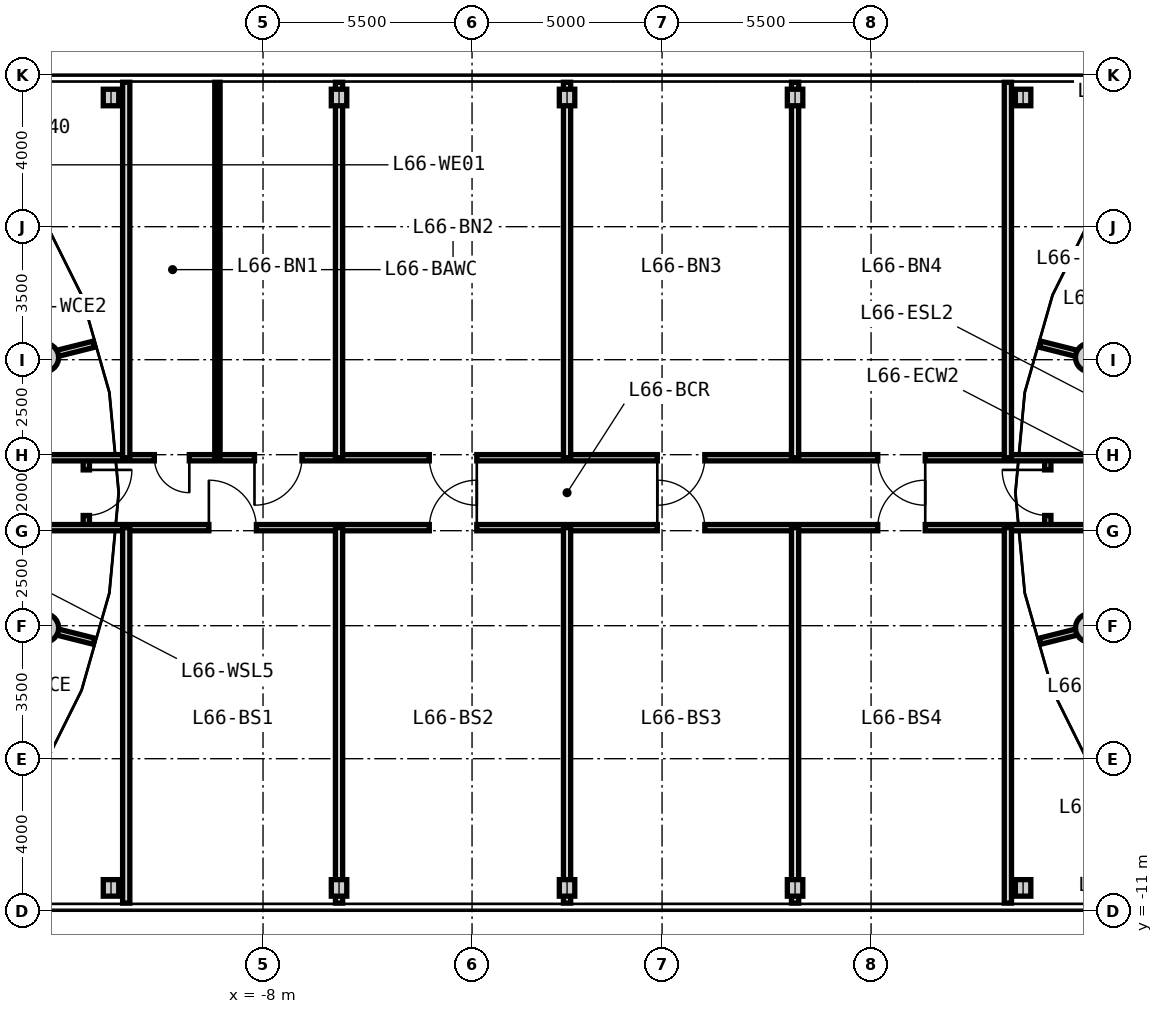
"""IFC4 building model, lengths in metres.
Left out: names, types, materials, properties, quantities, classifications, styles, units other than length and angle.
Written with IfcOpenShell. Run it as: python <this file> out.ifc"""

import sys

from ifc_helpers import new_model, si_unit, direction, frame, frame_2d, origin, origin_2d, place, context, subcontext, project, spatial, rectangle, circle, i_section, extrude, source, transform, mapped, element, fill, save


model = new_model("IFC4")
c1 = context("Model", 3, precision=1e-05, world=origin(), true_north=direction((0.0, 1.0)))
c2 = subcontext(c1, "Body", "Model", "MODEL_VIEW")
j1 = project(units=[si_unit("LENGTHUNIT", "METRE"), si_unit("PLANEANGLEUNIT", "RADIAN")], contexts=[c1])
p1 = place(None, origin())
s1 = spatial("IfcSite", under=j1, at=p1, CompositionType="ELEMENT")
p2 = place(p1, origin())
s2 = spatial("IfcBuilding", under=s1, at=p2, CompositionType="ELEMENT")
p3 = place(p2, frame((0.0, 0.0, 213.9)))
s3 = spatial("IfcBuildingStorey", under=s2, at=p3, CompositionType="ELEMENT", Elevation=213.9)
m1 = source(origin(), c2, "Body", "SweptSolid", [
    extrude(circle(Radius=0.375, at=origin_2d()), origin(), (0.0, 0.0, 1.0), 3.05),
])
for number, where, z_axis, x_axis in (
    (1, (-13.753, 3.559, 0.0), (0.0, 0.0, 1.0), (1.0, 0.0, 0.0)),
    (2, (-13.753, -3.559, 0.0), (0.0, 0.0, 1.0), (1.0, 0.0, 0.0)),
    (3, (13.753, 3.559, 0.0), (0.0, 0.0, 1.0), (1.0, 0.0, 0.0)),
    (4, (13.753, -3.559, 0.0), (0.0, 0.0, 1.0), (1.0, 0.0, 0.0)),
):
    element("IfcColumn", number, at=place(p3, frame(where, z_axis=z_axis, x_axis=x_axis)), inside=s3, PredefinedType="COLUMN", context=c2, shape_type="MappedRepresentation", body=[
        mapped(m1, transform((0.0, 0.0, 0.0), x_axis=(1.0, 0.0, 0.0), y_axis=(0.0, 1.0, 0.0), z_axis=(0.0, 0.0, 1.0), scale=1.0)),
    ])
m2 = source(origin(), c2, "Body", "SweptSolid", [
    extrude(i_section(OverallWidth=0.407, OverallDepth=0.435, WebThickness=0.024, FlangeThickness=0.039, FilletRadius=0.015, at=origin_2d()), origin(), (0.0, 0.0, 1.0), 3.05),
])
for number, where, z_axis, x_axis in (
    (5, (-12.0, -10.4, 0.0), (0.0, 0.0, 1.0), (1.0, 0.0, 0.0)),
    (6, (-12.0, 10.4, 0.0), (0.0, 0.0, 1.0), (1.0, 0.0, 0.0)),
    (7, (-6.0, -10.4, 0.0), (0.0, 0.0, 1.0), (1.0, 0.0, 0.0)),
    (8, (-6.0, 10.4, 0.0), (0.0, 0.0, 1.0), (1.0, 0.0, 0.0)),
    (9, (0.0, -10.4, 0.0), (0.0, 0.0, 1.0), (1.0, 0.0, 0.0)),
    (10, (0.0, 10.4, 0.0), (0.0, 0.0, 1.0), (1.0, 0.0, 0.0)),
    (11, (6.0, -10.4, 0.0), (0.0, 0.0, 1.0), (1.0, 0.0, 0.0)),
    (12, (6.0, 10.4, 0.0), (0.0, 0.0, 1.0), (1.0, 0.0, 0.0)),
    (13, (12.0, -10.4, 0.0), (0.0, 0.0, 1.0), (1.0, 0.0, 0.0)),
    (14, (12.0, 10.4, 0.0), (0.0, 0.0, 1.0), (1.0, 0.0, 0.0)),
):
    element("IfcColumn", number, at=place(p3, frame(where, z_axis=z_axis, x_axis=x_axis)), inside=s3, PredefinedType="COLUMN", context=c2, shape_type="MappedRepresentation", body=[
        mapped(m2, transform((0.0, 0.0, 0.0), x_axis=(1.0, 0.0, 0.0), y_axis=(0.0, 1.0, 0.0), z_axis=(0.0, 0.0, 1.0), scale=1.0)),
    ])
m3 = source(origin(), c2, "Body", "SweptSolid", [
    extrude(rectangle(XDim=6.157, YDim=0.165, at=frame_2d((3.079, 0.0))), origin(), (0.0, 0.0, 1.0), 2.345),
])
for number, where, z_axis, x_axis in (
    (15, (-18.42, -2.407, 0.0), (0.0, 0.0, 1.0), (0.97, -0.244, 0.0)),
    (16, (-18.42, 2.407, 0.0), (0.0, 0.0, 1.0), (0.97, 0.244, 0.0)),
    (17, (18.42, 2.407, 0.0), (0.0, 0.0, 1.0), (-0.97, 0.244, 0.0)),
    (18, (18.42, -2.407, 0.0), (0.0, 0.0, 1.0), (-0.97, -0.244, 0.0)),
):
    element("IfcWall", number, at=place(p3, frame(where, z_axis=z_axis, x_axis=x_axis)), inside=s3, PredefinedType="PARTITIONING", context=c2, shape_type="MappedRepresentation", body=[
        mapped(m3, transform((0.0, 0.0, 0.0), x_axis=(1.0, 0.0, 0.0), y_axis=(0.0, 1.0, 0.0), z_axis=(0.0, 0.0, 1.0), scale=1.0)),
    ])
m4 = source(origin(), c2, "Body", "SweptSolid", [
    extrude(rectangle(XDim=1.84, YDim=0.165, at=frame_2d((0.92, 0.0))), origin(), (0.0, 0.0, 1.0), 2.745),
])
p4 = place(p3, frame((-12.65, -0.92, 0.0), z_axis=(0.0, 0.0, 1.0), x_axis=(0.0, 1.0, 0.0)))
e19 = element("IfcWall", 19, at=p4, inside=s3, PredefinedType="PARTITIONING", context=c2, shape_type="MappedRepresentation", body=[
    mapped(m4, transform((0.0, 0.0, 0.0), x_axis=(1.0, 0.0, 0.0), y_axis=(0.0, 1.0, 0.0), z_axis=(0.0, 0.0, 1.0), scale=1.0)),
])
p5 = place(p4, frame((0.32, 0.0, 0.0)))
e20 = element("IfcOpeningElement", 20, at=p5, cuts=e19, PredefinedType="OPENING", context=c2, shape_type="SweptSolid", body=[
    extrude(rectangle(XDim=1.2, YDim=2.15, at=frame_2d((0.6, 1.075))), frame((0.0, 0.093, 0.0), z_axis=(0.0, -1.0, 0.0), x_axis=(1.0, 0.0, 0.0)), (0.0, 0.0, 1.0), 0.185),
])
p6 = place(p3, frame((12.65, -0.92, 0.0), z_axis=(0.0, 0.0, 1.0), x_axis=(0.0, 1.0, 0.0)))
e21 = element("IfcWall", 21, at=p6, inside=s3, PredefinedType="PARTITIONING", context=c2, shape_type="MappedRepresentation", body=[
    mapped(m4, transform((0.0, 0.0, 0.0), x_axis=(1.0, 0.0, 0.0), y_axis=(0.0, 1.0, 0.0), z_axis=(0.0, 0.0, 1.0), scale=1.0)),
])
p7 = place(p6, frame((0.32, 0.0, 0.0)))
e22 = element("IfcOpeningElement", 22, at=p7, cuts=e21, PredefinedType="OPENING", context=c2, shape_type="SweptSolid", body=[
    extrude(rectangle(XDim=1.2, YDim=2.15, at=frame_2d((0.6, 1.075))), frame((0.0, 0.093, 0.0), z_axis=(0.0, -1.0, 0.0), x_axis=(1.0, 0.0, 0.0)), (0.0, 0.0, 1.0), 0.185),
])
m5 = source(origin(), c2, "Body", "SweptSolid", [
    extrude(rectangle(XDim=37.0, YDim=0.165, at=frame_2d((18.5, 0.0))), origin(), (0.0, 0.0, 1.0), 2.745),
])
p8 = place(p3, frame((-18.5, -0.92, 0.0), z_axis=(0.0, 0.0, 1.0), x_axis=(1.0, 0.0, 0.0)))
e23 = element("IfcWall", 23, at=p8, inside=s3, PredefinedType="PARTITIONING", context=c2, shape_type="MappedRepresentation", body=[
    mapped(m5, transform((0.0, 0.0, 0.0), x_axis=(1.0, 0.0, 0.0), y_axis=(0.0, 1.0, 0.0), z_axis=(0.0, 0.0, 1.0), scale=1.0)),
])
p9 = place(p8, frame((2.662, 0.0, 0.0)))
e24 = element("IfcOpeningElement", 24, at=p9, cuts=e23, PredefinedType="OPENING", context=c2, shape_type="SweptSolid", body=[
    extrude(rectangle(XDim=0.95, YDim=2.1, at=frame_2d((0.475, 1.05))), frame((0.0, 0.093, 0.0), z_axis=(0.0, -1.0, 0.0), x_axis=(1.0, 0.0, 0.0)), (0.0, 0.0, 1.0), 0.185),
])
p10 = place(p8, frame((33.388, 0.0, 0.0)))
e25 = element("IfcOpeningElement", 25, at=p10, cuts=e23, PredefinedType="OPENING", context=c2, shape_type="SweptSolid", body=[
    extrude(rectangle(XDim=0.95, YDim=2.1, at=frame_2d((0.475, 1.05))), frame((0.0, 0.093, 0.0), z_axis=(0.0, -1.0, 0.0), x_axis=(1.0, 0.0, 0.0)), (0.0, 0.0, 1.0), 0.185),
])
p11 = place(p8, frame((9.075, 0.0, 0.0)))
e26 = element("IfcOpeningElement", 26, at=p11, cuts=e23, PredefinedType="OPENING", context=c2, shape_type="SweptSolid", body=[
    extrude(rectangle(XDim=1.25, YDim=2.2, at=frame_2d((0.625, 1.1))), frame((0.0, 0.093, 0.0), z_axis=(0.0, -1.0, 0.0), x_axis=(1.0, 0.0, 0.0)), (0.0, 0.0, 1.0), 0.185),
])
p12 = place(p8, frame((14.875, 0.0, 0.0)))
e27 = element("IfcOpeningElement", 27, at=p12, cuts=e23, PredefinedType="OPENING", context=c2, shape_type="SweptSolid", body=[
    extrude(rectangle(XDim=1.25, YDim=2.2, at=frame_2d((0.625, 1.1))), frame((0.0, 0.093, 0.0), z_axis=(0.0, -1.0, 0.0), x_axis=(1.0, 0.0, 0.0)), (0.0, 0.0, 1.0), 0.185),
])
p13 = place(p8, frame((20.875, 0.0, 0.0)))
e28 = element("IfcOpeningElement", 28, at=p13, cuts=e23, PredefinedType="OPENING", context=c2, shape_type="SweptSolid", body=[
    extrude(rectangle(XDim=1.25, YDim=2.2, at=frame_2d((0.625, 1.1))), frame((0.0, 0.093, 0.0), z_axis=(0.0, -1.0, 0.0), x_axis=(1.0, 0.0, 0.0)), (0.0, 0.0, 1.0), 0.185),
])
p14 = place(p8, frame((26.675, 0.0, 0.0)))
e29 = element("IfcOpeningElement", 29, at=p14, cuts=e23, PredefinedType="OPENING", context=c2, shape_type="SweptSolid", body=[
    extrude(rectangle(XDim=1.25, YDim=2.2, at=frame_2d((0.625, 1.1))), frame((0.0, 0.093, 0.0), z_axis=(0.0, -1.0, 0.0), x_axis=(1.0, 0.0, 0.0)), (0.0, 0.0, 1.0), 0.185),
])
p15 = place(p3, frame((-18.5, 0.92, 0.0), z_axis=(0.0, 0.0, 1.0), x_axis=(1.0, 0.0, 0.0)))
e30 = element("IfcWall", 30, at=p15, inside=s3, PredefinedType="PARTITIONING", context=c2, shape_type="MappedRepresentation", body=[
    mapped(m5, transform((0.0, 0.0, 0.0), x_axis=(1.0, 0.0, 0.0), y_axis=(0.0, 1.0, 0.0), z_axis=(0.0, 0.0, 1.0), scale=1.0)),
])
p16 = place(p15, frame((2.662, 0.0, 0.0)))
e31 = element("IfcOpeningElement", 31, at=p16, cuts=e30, PredefinedType="OPENING", context=c2, shape_type="SweptSolid", body=[
    extrude(rectangle(XDim=0.95, YDim=2.1, at=frame_2d((0.475, 1.05))), frame((0.0, 0.093, 0.0), z_axis=(0.0, -1.0, 0.0), x_axis=(1.0, 0.0, 0.0)), (0.0, 0.0, 1.0), 0.185),
])
p17 = place(p15, frame((33.388, 0.0, 0.0)))
e32 = element("IfcOpeningElement", 32, at=p17, cuts=e30, PredefinedType="OPENING", context=c2, shape_type="SweptSolid", body=[
    extrude(rectangle(XDim=0.95, YDim=2.1, at=frame_2d((0.475, 1.05))), frame((0.0, 0.093, 0.0), z_axis=(0.0, -1.0, 0.0), x_axis=(1.0, 0.0, 0.0)), (0.0, 0.0, 1.0), 0.185),
])
p18 = place(p15, frame((7.64, 0.0, 0.0)))
e33 = element("IfcOpeningElement", 33, at=p18, cuts=e30, PredefinedType="OPENING", context=c2, shape_type="SweptSolid", body=[
    extrude(rectangle(XDim=0.92, YDim=2.1, at=frame_2d((0.46, 1.05))), frame((0.0, 0.093, 0.0), z_axis=(0.0, -1.0, 0.0), x_axis=(1.0, 0.0, 0.0)), (0.0, 0.0, 1.0), 0.185),
])
p19 = place(p15, frame((10.275, 0.0, 0.0)))
e34 = element("IfcOpeningElement", 34, at=p19, cuts=e30, PredefinedType="OPENING", context=c2, shape_type="SweptSolid", body=[
    extrude(rectangle(XDim=1.25, YDim=2.2, at=frame_2d((0.625, 1.1))), frame((0.0, 0.093, 0.0), z_axis=(0.0, -1.0, 0.0), x_axis=(1.0, 0.0, 0.0)), (0.0, 0.0, 1.0), 0.185),
])
p20 = place(p15, frame((14.875, 0.0, 0.0)))
e35 = element("IfcOpeningElement", 35, at=p20, cuts=e30, PredefinedType="OPENING", context=c2, shape_type="SweptSolid", body=[
    extrude(rectangle(XDim=1.25, YDim=2.2, at=frame_2d((0.625, 1.1))), frame((0.0, 0.093, 0.0), z_axis=(0.0, -1.0, 0.0), x_axis=(1.0, 0.0, 0.0)), (0.0, 0.0, 1.0), 0.185),
])
p21 = place(p15, frame((20.875, 0.0, 0.0)))
e36 = element("IfcOpeningElement", 36, at=p21, cuts=e30, PredefinedType="OPENING", context=c2, shape_type="SweptSolid", body=[
    extrude(rectangle(XDim=1.25, YDim=2.2, at=frame_2d((0.625, 1.1))), frame((0.0, 0.093, 0.0), z_axis=(0.0, -1.0, 0.0), x_axis=(1.0, 0.0, 0.0)), (0.0, 0.0, 1.0), 0.185),
])
p22 = place(p15, frame((26.675, 0.0, 0.0)))
e37 = element("IfcOpeningElement", 37, at=p22, cuts=e30, PredefinedType="OPENING", context=c2, shape_type="SweptSolid", body=[
    extrude(rectangle(XDim=1.25, YDim=2.2, at=frame_2d((0.625, 1.1))), frame((0.0, 0.093, 0.0), z_axis=(0.0, -1.0, 0.0), x_axis=(1.0, 0.0, 0.0)), (0.0, 0.0, 1.0), 0.185),
])
m6 = source(origin(), c2, "Body", "SweptSolid", [
    extrude(rectangle(XDim=9.88, YDim=0.19, at=frame_2d((4.94, 0.0))), origin(), (0.0, 0.0, 1.0), 2.745),
])
for number, where, z_axis, x_axis in (
    (38, (-11.6, -10.8, 0.0), (0.0, 0.0, 1.0), (0.0, 1.0, 0.0)),
    (39, (-11.6, 0.92, 0.0), (0.0, 0.0, 1.0), (0.0, 1.0, 0.0)),
    (40, (11.6, -10.8, 0.0), (0.0, 0.0, 1.0), (0.0, 1.0, 0.0)),
    (41, (11.6, 0.92, 0.0), (0.0, 0.0, 1.0), (0.0, 1.0, 0.0)),
):
    element("IfcWall", number, at=place(p3, frame(where, z_axis=z_axis, x_axis=x_axis)), inside=s3, PredefinedType="PARTITIONING", context=c2, shape_type="MappedRepresentation", body=[
        mapped(m6, transform((0.0, 0.0, 0.0), x_axis=(1.0, 0.0, 0.0), y_axis=(0.0, 1.0, 0.0), z_axis=(0.0, 0.0, 1.0), scale=1.0)),
    ])
m7 = source(origin(), c2, "Body", "SweptSolid", [
    extrude(rectangle(XDim=9.88, YDim=0.19, at=frame_2d((4.94, 0.0))), origin(), (0.0, 0.0, 1.0), 2.045),
])
for number, where, z_axis, x_axis in (
    (42, (-6.0, -10.8, 0.0), (0.0, 0.0, 1.0), (0.0, 1.0, 0.0)),
    (43, (-6.0, 0.92, 0.0), (0.0, 0.0, 1.0), (0.0, 1.0, 0.0)),
):
    element("IfcWall", number, at=place(p3, frame(where, z_axis=z_axis, x_axis=x_axis)), inside=s3, PredefinedType="PARTITIONING", context=c2, shape_type="MappedRepresentation", body=[
        mapped(m7, transform((0.0, 0.0, 0.0), x_axis=(1.0, 0.0, 0.0), y_axis=(0.0, 1.0, 0.0), z_axis=(0.0, 0.0, 1.0), scale=1.0)),
    ])
m8 = source(origin(), c2, "Body", "SweptSolid", [
    extrude(rectangle(XDim=9.88, YDim=0.14, at=frame_2d((4.94, 0.0))), origin(), (0.0, 0.0, 1.0), 2.745),
])
p23 = place(p3, frame((-9.2, 0.92, 0.0), z_axis=(0.0, 0.0, 1.0), x_axis=(0.0, 1.0, 0.0)))
e44 = element("IfcWall", 44, at=p23, inside=s3, PredefinedType="PARTITIONING", context=c2, shape_type="MappedRepresentation", body=[
    mapped(m8, transform((0.0, 0.0, 0.0), x_axis=(1.0, 0.0, 0.0), y_axis=(0.0, 1.0, 0.0), z_axis=(0.0, 0.0, 1.0), scale=1.0)),
])
for number, where, z_axis, x_axis in (
    (45, (0.0, -10.8, 0.0), (0.0, 0.0, 1.0), (0.0, 1.0, 0.0)),
    (46, (0.0, 0.92, 0.0), (0.0, 0.0, 1.0), (0.0, 1.0, 0.0)),
    (47, (6.0, -10.8, 0.0), (0.0, 0.0, 1.0), (0.0, 1.0, 0.0)),
    (48, (6.0, 0.92, 0.0), (0.0, 0.0, 1.0), (0.0, 1.0, 0.0)),
):
    element("IfcWall", number, at=place(p3, frame(where, z_axis=z_axis, x_axis=x_axis)), inside=s3, PredefinedType="PARTITIONING", context=c2, shape_type="MappedRepresentation", body=[
        mapped(m7, transform((0.0, 0.0, 0.0), x_axis=(1.0, 0.0, 0.0), y_axis=(0.0, 1.0, 0.0), z_axis=(0.0, 0.0, 1.0), scale=1.0)),
    ])
m9 = source(origin(), c2, "Body", "SweptSolid", [
    extrude(rectangle(XDim=1.2, YDim=2.15, at=frame_2d((0.6, 1.075))), frame((0.0, 0.025, 0.0), z_axis=(0.0, -1.0, 0.0), x_axis=(1.0, 0.0, 0.0)), (0.0, 0.0, 1.0), 0.05),
])
p24 = place(p5, frame((1.2, 0.0, 0.0), z_axis=(0.0, 0.0, 1.0), x_axis=(-1.0, 0.0, 0.0)))
e49 = element("IfcDoor", 49, at=p24, inside=s3, OperationType="SINGLE_SWING_LEFT", PredefinedType="DOOR", context=c2, shape_type="MappedRepresentation", body=[
    mapped(m9, transform((0.0, 0.0, 0.0), x_axis=(1.0, 0.0, 0.0), y_axis=(0.0, 1.0, 0.0), z_axis=(0.0, 0.0, 1.0), scale=1.0)),
])
fill(e20, e49)
p25 = place(p7, origin())
e50 = element("IfcDoor", 50, at=p25, inside=s3, OperationType="SINGLE_SWING_RIGHT", PredefinedType="DOOR", context=c2, shape_type="MappedRepresentation", body=[
    mapped(m9, transform((0.0, 0.0, 0.0), x_axis=(1.0, 0.0, 0.0), y_axis=(0.0, 1.0, 0.0), z_axis=(0.0, 0.0, 1.0), scale=1.0)),
])
fill(e22, e50)
m10 = source(origin(), c2, "Body", "SweptSolid", [
    extrude(rectangle(XDim=1.25, YDim=2.2, at=frame_2d((0.625, 1.1))), frame((0.0, 0.025, 0.0), z_axis=(0.0, -1.0, 0.0), x_axis=(1.0, 0.0, 0.0)), (0.0, 0.0, 1.0), 0.05),
])
p26 = place(p11, origin())
e51 = element("IfcDoor", 51, at=p26, inside=s3, OperationType="SINGLE_SWING_LEFT", PredefinedType="DOOR", context=c2, shape_type="MappedRepresentation", body=[
    mapped(m10, transform((0.0, 0.0, 0.0), x_axis=(1.0, 0.0, 0.0), y_axis=(0.0, 1.0, 0.0), z_axis=(0.0, 0.0, 1.0), scale=1.0)),
])
fill(e26, e51)
m11 = source(origin(), c2, "Body", "SweptSolid", [
    extrude(rectangle(XDim=0.92, YDim=2.1, at=frame_2d((0.46, 1.05))), frame((0.0, 0.025, 0.0), z_axis=(0.0, -1.0, 0.0), x_axis=(1.0, 0.0, 0.0)), (0.0, 0.0, 1.0), 0.05),
])
p27 = place(p18, frame((0.92, 0.0, 0.0), z_axis=(0.0, 0.0, 1.0), x_axis=(-1.0, 0.0, 0.0)))
e52 = element("IfcDoor", 52, at=p27, inside=s3, OperationType="SINGLE_SWING_LEFT", PredefinedType="DOOR", context=c2, shape_type="MappedRepresentation", body=[
    mapped(m11, transform((0.0, 0.0, 0.0), x_axis=(1.0, 0.0, 0.0), y_axis=(0.0, 1.0, 0.0), z_axis=(0.0, 0.0, 1.0), scale=1.0)),
])
fill(e33, e52)
p28 = place(p19, frame((1.25, 0.0, 0.0), z_axis=(0.0, 0.0, 1.0), x_axis=(-1.0, 0.0, 0.0)))
e53 = element("IfcDoor", 53, at=p28, inside=s3, OperationType="SINGLE_SWING_RIGHT", PredefinedType="DOOR", context=c2, shape_type="MappedRepresentation", body=[
    mapped(m10, transform((0.0, 0.0, 0.0), x_axis=(1.0, 0.0, 0.0), y_axis=(0.0, 1.0, 0.0), z_axis=(0.0, 0.0, 1.0), scale=1.0)),
])
fill(e34, e53)
p29 = place(p12, origin())
e54 = element("IfcDoor", 54, at=p29, inside=s3, OperationType="SINGLE_SWING_RIGHT", PredefinedType="DOOR", context=c2, shape_type="MappedRepresentation", body=[
    mapped(m10, transform((0.0, 0.0, 0.0), x_axis=(1.0, 0.0, 0.0), y_axis=(0.0, 1.0, 0.0), z_axis=(0.0, 0.0, 1.0), scale=1.0)),
])
fill(e27, e54)
p30 = place(p20, frame((1.25, 0.0, 0.0), z_axis=(0.0, 0.0, 1.0), x_axis=(-1.0, 0.0, 0.0)))
e55 = element("IfcDoor", 55, at=p30, inside=s3, OperationType="SINGLE_SWING_LEFT", PredefinedType="DOOR", context=c2, shape_type="MappedRepresentation", body=[
    mapped(m10, transform((0.0, 0.0, 0.0), x_axis=(1.0, 0.0, 0.0), y_axis=(0.0, 1.0, 0.0), z_axis=(0.0, 0.0, 1.0), scale=1.0)),
])
fill(e35, e55)
p31 = place(p13, origin())
e56 = element("IfcDoor", 56, at=p31, inside=s3, OperationType="SINGLE_SWING_LEFT", PredefinedType="DOOR", context=c2, shape_type="MappedRepresentation", body=[
    mapped(m10, transform((0.0, 0.0, 0.0), x_axis=(1.0, 0.0, 0.0), y_axis=(0.0, 1.0, 0.0), z_axis=(0.0, 0.0, 1.0), scale=1.0)),
])
fill(e28, e56)
p32 = place(p21, frame((1.25, 0.0, 0.0), z_axis=(0.0, 0.0, 1.0), x_axis=(-1.0, 0.0, 0.0)))
e57 = element("IfcDoor", 57, at=p32, inside=s3, OperationType="SINGLE_SWING_RIGHT", PredefinedType="DOOR", context=c2, shape_type="MappedRepresentation", body=[
    mapped(m10, transform((0.0, 0.0, 0.0), x_axis=(1.0, 0.0, 0.0), y_axis=(0.0, 1.0, 0.0), z_axis=(0.0, 0.0, 1.0), scale=1.0)),
])
fill(e36, e57)
p33 = place(p14, origin())
e58 = element("IfcDoor", 58, at=p33, inside=s3, OperationType="SINGLE_SWING_RIGHT", PredefinedType="DOOR", context=c2, shape_type="MappedRepresentation", body=[
    mapped(m10, transform((0.0, 0.0, 0.0), x_axis=(1.0, 0.0, 0.0), y_axis=(0.0, 1.0, 0.0), z_axis=(0.0, 0.0, 1.0), scale=1.0)),
])
fill(e29, e58)
p34 = place(p22, frame((1.25, 0.0, 0.0), z_axis=(0.0, 0.0, 1.0), x_axis=(-1.0, 0.0, 0.0)))
e59 = element("IfcDoor", 59, at=p34, inside=s3, OperationType="SINGLE_SWING_LEFT", PredefinedType="DOOR", context=c2, shape_type="MappedRepresentation", body=[
    mapped(m10, transform((0.0, 0.0, 0.0), x_axis=(1.0, 0.0, 0.0), y_axis=(0.0, 1.0, 0.0), z_axis=(0.0, 0.0, 1.0), scale=1.0)),
])
fill(e37, e59)
save(model, sys.argv[1])
